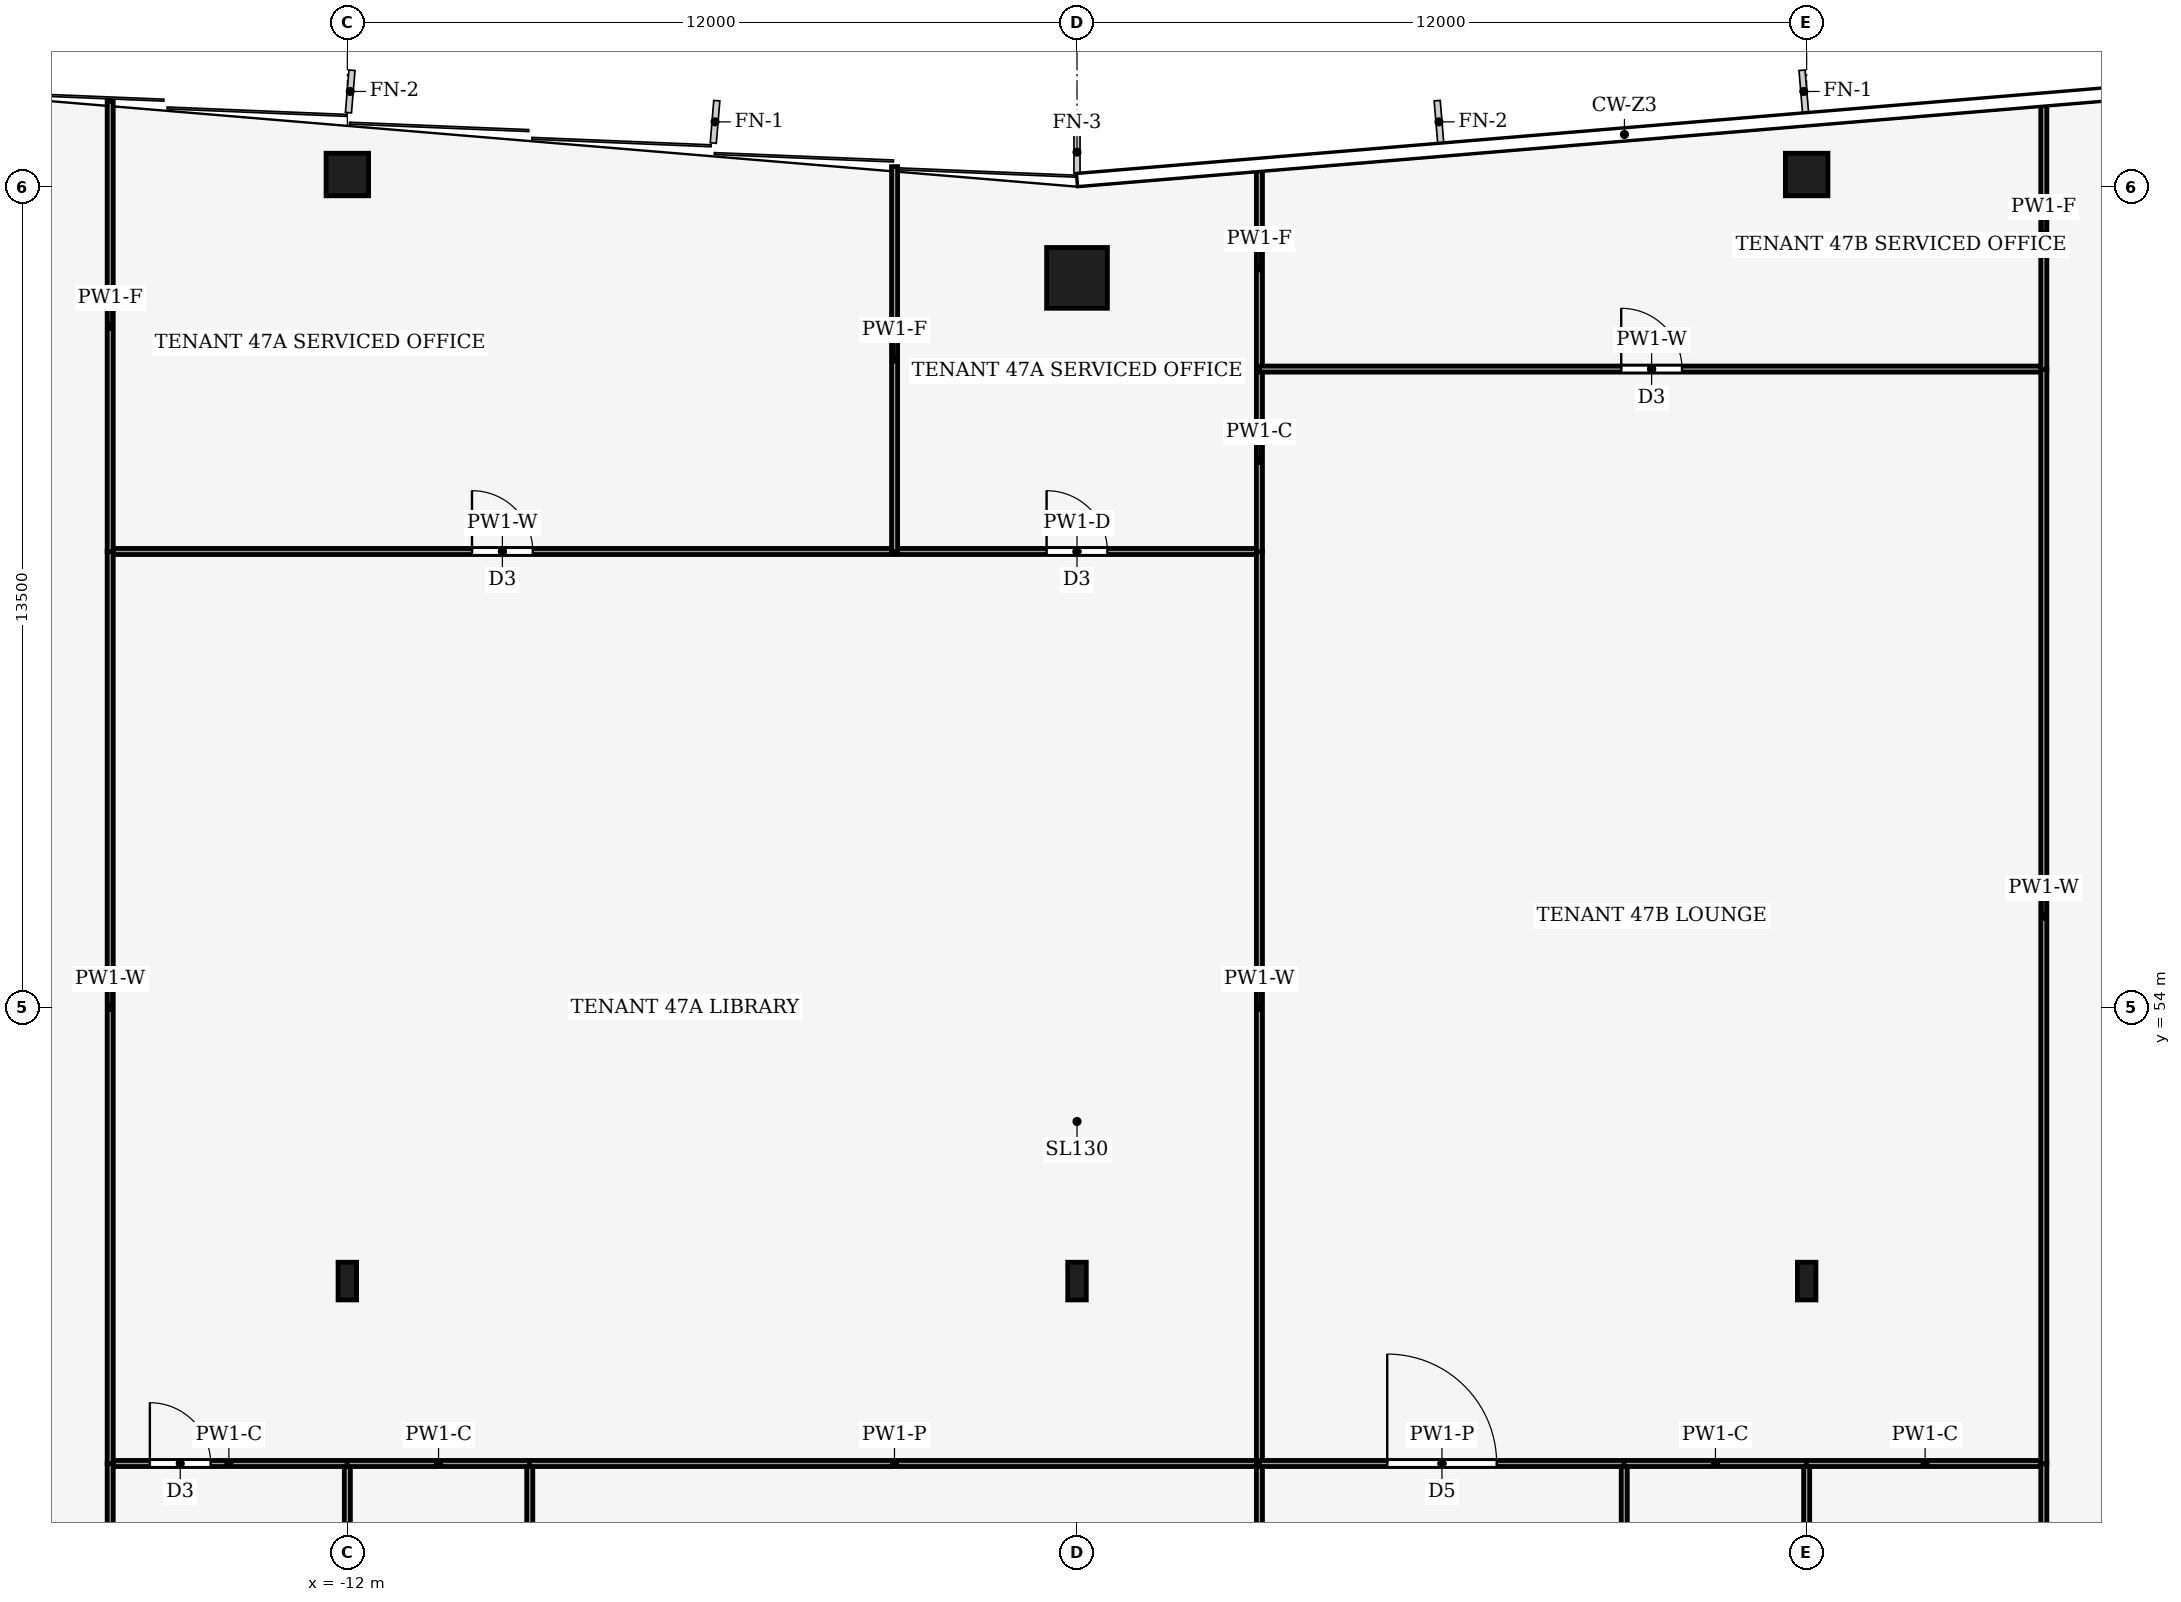
"""IFC4 building model, lengths in metres.
Left out: names, types, materials, properties, quantities, classifications, styles, units other than length and angle.
Written with IfcOpenShell. Run it as: python <this file> out.ifc"""

import sys

from ifc_helpers import new_model, si_unit, direction, frame, frame_2d, origin, origin_2d, place, context, subcontext, project, spatial, rectangle, hollow_rectangle, i_section, extrude, element, fill, save


model = new_model("IFC4")
c1 = context("Model", 3, precision=1e-05, world=origin(), true_north=direction((0.0, 1.0)))
c2 = subcontext(c1, "Body", "Model", "MODEL_VIEW")
j1 = project(units=[si_unit("LENGTHUNIT", "METRE"), si_unit("PLANEANGLEUNIT", "RADIAN")], contexts=[c1])
p1 = place(None, origin())
s1 = spatial("IfcSite", under=j1, at=p1, CompositionType="ELEMENT")
p2 = place(p1, origin())
s2 = spatial("IfcBuilding", under=s1, at=p2, CompositionType="ELEMENT")
p3 = place(p2, frame((0.0, 0.0, 206.0)))
s3 = spatial("IfcBuildingStorey", under=s2, at=p3, CompositionType="ELEMENT", Elevation=206.0)
p4 = place(p3, frame((0.0, 66.0, 0.0), z_axis=(0.0, 0.0, 1.0), x_axis=(1.0, 0.0, 0.0)))
e1 = element("IfcColumn", 1, at=p4, inside=s3, PredefinedType="COLUMN", context=c2, shape_type="SweptSolid", body=[
    extrude(hollow_rectangle(XDim=1.0, YDim=1.0, WallThickness=0.06, at=origin_2d()), origin(), (0.0, 0.0, 1.0), 4.0),
])
for number, where, z_axis, x_axis in (
    (2, (-12.0, 67.7, 0.0), (0.0, 0.0, 1.0), (1.0, 0.0, 0.0)),
    (3, (12.0, 67.7, 0.0), (0.0, 0.0, 1.0), (1.0, 0.0, 0.0)),
):
    element("IfcColumn", number, at=place(p3, frame(where, z_axis=z_axis, x_axis=x_axis)), inside=s3, PredefinedType="COLUMN", context=c2, shape_type="SweptSolid", body=[
        extrude(hollow_rectangle(XDim=0.7, YDim=0.7, WallThickness=0.03, at=origin_2d()), origin(), (0.0, 0.0, 1.0), 4.0),
    ])
for number, where, z_axis, x_axis in (
    (4, (-12.0, 49.5, 0.0), (0.0, 0.0, 1.0), (1.0, 0.0, 0.0)),
    (5, (0.0, 49.5, 0.0), (0.0, 0.0, 1.0), (1.0, 0.0, 0.0)),
    (6, (12.0, 49.5, 0.0), (0.0, 0.0, 1.0), (1.0, 0.0, 0.0)),
):
    element("IfcColumn", number, at=place(p3, frame(where, z_axis=z_axis, x_axis=x_axis)), inside=s3, PredefinedType="COLUMN", context=c2, shape_type="SweptSolid", body=[
        extrude(i_section(OverallWidth=0.305, OverallDepth=0.62, WebThickness=0.021, FlangeThickness=0.04, FilletRadius=0.027, at=origin_2d()), origin(), (0.0, 0.0, 1.0), 4.0),
    ])
p5 = place(p3, frame((-12.0, 46.5, 0.0), z_axis=(0.0, 0.0, 1.0), x_axis=(0.0, -1.0, 0.0)))
e7 = element("IfcWall", 7, at=p5, inside=s3, PredefinedType="PARTITIONING", context=c2, shape_type="SweptSolid", body=[
    extrude(rectangle(XDim=5.6, YDim=0.1, at=frame_2d((2.8, 0.0))), origin(), (0.0, 0.0, 1.0), 3.44),
])
p6 = place(p5, frame((2.3, 0.0, 0.0)))
e8 = element("IfcOpeningElement", 8, at=p6, cuts=e7, PredefinedType="OPENING", context=c2, shape_type="SweptSolid", body=[
    extrude(rectangle(XDim=1.0, YDim=2.1, at=frame_2d((0.5, 1.05))), frame((0.0, 0.06, 0.0), z_axis=(0.0, -1.0, 0.0), x_axis=(1.0, 0.0, 0.0)), (0.0, 0.0, 1.0), 0.12),
])
p7 = place(p3, frame((-15.9, 46.5, 0.0), z_axis=(0.0, 0.0, 1.0), x_axis=(1.0, 0.0, 0.0)))
e9 = element("IfcWall", 9, at=p7, inside=s3, PredefinedType="PARTITIONING", context=c2, shape_type="SweptSolid", body=[
    extrude(rectangle(XDim=3.904, YDim=0.1, at=frame_2d((1.952, 0.0))), origin(), (0.0, 0.0, 1.0), 3.87),
])
p8 = place(p7, frame((0.652, 0.0, 0.0)))
e10 = element("IfcOpeningElement", 10, at=p8, cuts=e9, PredefinedType="OPENING", context=c2, shape_type="SweptSolid", body=[
    extrude(rectangle(XDim=1.0, YDim=2.1, at=frame_2d((0.5, 1.05))), frame((0.0, 0.06, 0.0), z_axis=(0.0, -1.0, 0.0), x_axis=(1.0, 0.0, 0.0)), (0.0, 0.0, 1.0), 0.12),
])
p9 = place(p3, frame((-15.9, 46.504, 0.0), z_axis=(0.0, 0.0, 1.0), x_axis=(0.0, -1.0, 0.0)))
e11 = element("IfcWall", 11, at=p9, inside=s3, PredefinedType="PARTITIONING", context=c2, shape_type="SweptSolid", body=[
    extrude(rectangle(XDim=5.608, YDim=0.1, at=frame_2d((2.804, 0.0))), origin(), (0.0, 0.0, 1.0), 3.44),
])
p10 = place(p3, frame((-9.0, 40.9, 0.0), z_axis=(0.0, 0.0, 1.0), x_axis=(0.0, 1.0, 0.0)))
e12 = element("IfcWall", 12, at=p10, inside=s3, PredefinedType="PARTITIONING", context=c2, shape_type="SweptSolid", body=[
    extrude(rectangle(XDim=5.6, YDim=0.1, at=frame_2d((2.8, 0.0))), origin(), (0.0, 0.0, 1.0), 3.87),
])
p11 = place(p3, frame((-8.996, 46.5, 0.0), z_axis=(0.0, 0.0, 1.0), x_axis=(-1.0, 0.0, 0.0)))
e13 = element("IfcWall", 13, at=p11, inside=s3, PredefinedType="PARTITIONING", context=c2, shape_type="SweptSolid", body=[
    extrude(rectangle(XDim=3.008, YDim=0.1, at=frame_2d((1.504, 0.0))), origin(), (0.0, 0.0, 1.0), 3.87),
])
p12 = place(p3, frame((3.0, 46.5, 0.0), z_axis=(0.0, 0.0, 1.0), x_axis=(-1.0, 0.0, 0.0)))
e14 = element("IfcWall", 14, at=p12, inside=s3, PredefinedType="PARTITIONING", context=c2, shape_type="SweptSolid", body=[
    extrude(rectangle(XDim=12.004, YDim=0.1, at=frame_2d((6.002, 0.0))), origin(), (0.0, 0.0, 1.0), 3.44),
])
p13 = place(p3, frame((3.0, 40.9, 0.0), z_axis=(0.0, 0.0, 1.0), x_axis=(0.0, 1.0, 0.0)))
e15 = element("IfcWall", 15, at=p13, inside=s3, PredefinedType="PARTITIONING", context=c2, shape_type="SweptSolid", body=[
    extrude(rectangle(XDim=5.6, YDim=0.1, at=frame_2d((2.8, 0.0))), origin(), (0.0, 0.0, 1.0), 3.87),
])
p14 = place(p3, frame((-15.9, 61.5, 0.0), z_axis=(0.0, 0.0, 1.0), x_axis=(1.0, 0.0, 0.0)))
e16 = element("IfcWall", 16, at=p14, inside=s3, PredefinedType="PARTITIONING", context=c2, shape_type="SweptSolid", body=[
    extrude(rectangle(XDim=12.9, YDim=0.1, at=frame_2d((6.45, 0.0))), origin(), (0.0, 0.0, 1.0), 3.24),
])
p15 = place(p14, frame((5.95, 0.0, 0.0)))
e17 = element("IfcOpeningElement", 17, at=p15, cuts=e16, PredefinedType="OPENING", context=c2, shape_type="SweptSolid", body=[
    extrude(rectangle(XDim=1.0, YDim=2.1, at=frame_2d((0.5, 1.05))), frame((0.0, 0.06, 0.0), z_axis=(0.0, -1.0, 0.0), x_axis=(1.0, 0.0, 0.0)), (0.0, 0.0, 1.0), 0.12),
])
p16 = place(p3, frame((-3.0, 61.5, 0.0), z_axis=(0.0, 0.0, 1.0), x_axis=(1.0, 0.0, 0.0)))
e18 = element("IfcWall", 18, at=p16, inside=s3, PredefinedType="PARTITIONING", context=c2, shape_type="SweptSolid", body=[
    extrude(rectangle(XDim=6.0, YDim=0.1, at=frame_2d((3.0, 0.0))), origin(), (0.0, 0.0, 1.0), 3.29),
])
p17 = place(p16, frame((2.5, 0.0, 0.0)))
e19 = element("IfcOpeningElement", 19, at=p17, cuts=e18, PredefinedType="OPENING", context=c2, shape_type="SweptSolid", body=[
    extrude(rectangle(XDim=1.0, YDim=2.1, at=frame_2d((0.5, 1.05))), frame((0.0, 0.06, 0.0), z_axis=(0.0, -1.0, 0.0), x_axis=(1.0, 0.0, 0.0)), (0.0, 0.0, 1.0), 0.12),
])
p18 = place(p3, frame((3.0, 46.5, 0.0), z_axis=(0.0, 0.0, 1.0), x_axis=(0.0, 1.0, 0.0)))
e20 = element("IfcWall", 20, at=p18, inside=s3, PredefinedType="PARTITIONING", context=c2, shape_type="SweptSolid", body=[
    extrude(rectangle(XDim=15.004, YDim=0.1, at=frame_2d((7.502, 0.0))), origin(), (0.0, 0.0, 1.0), 3.24),
])
p19 = place(p3, frame((-15.9, 61.504, 0.0), z_axis=(0.0, 0.0, 1.0), x_axis=(0.0, -1.0, 0.0)))
e21 = element("IfcWall", 21, at=p19, inside=s3, PredefinedType="PARTITIONING", context=c2, shape_type="SweptSolid", body=[
    extrude(rectangle(XDim=15.008, YDim=0.1, at=frame_2d((7.504, 0.0))), origin(), (0.0, 0.0, 1.0), 3.24),
])
p20 = place(p3, frame((-3.0, 61.5, 0.0), z_axis=(0.0, 0.0, 1.0), x_axis=(0.0, 1.0, 0.0)))
e22 = element("IfcWall", 22, at=p20, inside=s3, PredefinedType="PARTITIONING", context=c2, shape_type="SweptSolid", body=[
    extrude(rectangle(XDim=6.33, YDim=0.1, at=frame_2d((3.165, 0.0))), origin(), (0.0, 0.0, 1.0), 3.04),
])
p21 = place(p3, frame((-15.9, 68.905, 0.0), z_axis=(0.0, 0.0, 1.0), x_axis=(0.0, -1.0, 0.0)))
e23 = element("IfcWall", 23, at=p21, inside=s3, PredefinedType="PARTITIONING", context=c2, shape_type="SweptSolid", body=[
    extrude(rectangle(XDim=7.409, YDim=0.1, at=frame_2d((3.705, 0.0))), origin(), (0.0, 0.0, 1.0), 3.04),
])
p22 = place(p3, frame((3.0, 61.496, 0.0), z_axis=(0.0, 0.0, 1.0), x_axis=(0.0, 1.0, 0.0)))
e24 = element("IfcWall", 24, at=p22, inside=s3, PredefinedType="PARTITIONING", context=c2, shape_type="SweptSolid", body=[
    extrude(rectangle(XDim=3.004, YDim=0.1, at=frame_2d((1.502, 0.0))), origin(), (0.0, 0.0, 1.0), 3.87),
])
p23 = place(p3, frame((3.0, 64.5, 0.0), z_axis=(0.0, 0.0, 1.0), x_axis=(0.0, 1.0, 0.0)))
e25 = element("IfcWall", 25, at=p23, inside=s3, PredefinedType="PARTITIONING", context=c2, shape_type="SweptSolid", body=[
    extrude(rectangle(XDim=3.33, YDim=0.1, at=frame_2d((1.665, 0.0))), origin(), (0.0, 0.0, 1.0), 3.04),
])
p24 = place(p3, frame((9.0, 46.5, 0.0), z_axis=(0.0, 0.0, 1.0), x_axis=(0.0, -1.0, 0.0)))
e26 = element("IfcWall", 26, at=p24, inside=s3, PredefinedType="PARTITIONING", context=c2, shape_type="SweptSolid", body=[
    extrude(rectangle(XDim=5.6, YDim=0.1, at=frame_2d((2.8, 0.0))), origin(), (0.0, 0.0, 1.0), 3.87),
])
p25 = place(p24, frame((2.3, 0.0, 0.0)))
e27 = element("IfcOpeningElement", 27, at=p25, cuts=e26, PredefinedType="OPENING", context=c2, shape_type="SweptSolid", body=[
    extrude(rectangle(XDim=1.0, YDim=2.1, at=frame_2d((0.5, 1.05))), frame((0.0, 0.06, 0.0), z_axis=(0.0, -1.0, 0.0), x_axis=(1.0, 0.0, 0.0)), (0.0, 0.0, 1.0), 0.12),
])
p26 = place(p3, frame((3.0, 46.5, 0.0), z_axis=(0.0, 0.0, 1.0), x_axis=(1.0, 0.0, 0.0)))
e28 = element("IfcWall", 28, at=p26, inside=s3, PredefinedType="PARTITIONING", context=c2, shape_type="SweptSolid", body=[
    extrude(rectangle(XDim=6.004, YDim=0.1, at=frame_2d((3.002, 0.0))), origin(), (0.0, 0.0, 1.0), 3.44),
])
p27 = place(p26, frame((2.102, 0.0, 0.0)))
e29 = element("IfcOpeningElement", 29, at=p27, cuts=e28, PredefinedType="OPENING", context=c2, shape_type="SweptSolid", body=[
    extrude(rectangle(XDim=1.8, YDim=2.1, at=frame_2d((0.9, 1.05))), frame((0.0, 0.06, 0.0), z_axis=(0.0, -1.0, 0.0), x_axis=(1.0, 0.0, 0.0)), (0.0, 0.0, 1.0), 0.12),
])
p28 = place(p3, frame((12.0, 40.9, 0.0), z_axis=(0.0, 0.0, 1.0), x_axis=(0.0, 1.0, 0.0)))
e30 = element("IfcWall", 30, at=p28, inside=s3, PredefinedType="PARTITIONING", context=c2, shape_type="SweptSolid", body=[
    extrude(rectangle(XDim=5.6, YDim=0.1, at=frame_2d((2.8, 0.0))), origin(), (0.0, 0.0, 1.0), 3.44),
])
p29 = place(p3, frame((12.004, 46.5, 0.0), z_axis=(0.0, 0.0, 1.0), x_axis=(-1.0, 0.0, 0.0)))
e31 = element("IfcWall", 31, at=p29, inside=s3, PredefinedType="PARTITIONING", context=c2, shape_type="SweptSolid", body=[
    extrude(rectangle(XDim=3.008, YDim=0.1, at=frame_2d((1.504, 0.0))), origin(), (0.0, 0.0, 1.0), 3.87),
])
p30 = place(p3, frame((15.9, 46.5, 0.0), z_axis=(0.0, 0.0, 1.0), x_axis=(-1.0, 0.0, 0.0)))
e32 = element("IfcWall", 32, at=p30, inside=s3, PredefinedType="PARTITIONING", context=c2, shape_type="SweptSolid", body=[
    extrude(rectangle(XDim=3.904, YDim=0.1, at=frame_2d((1.952, 0.0))), origin(), (0.0, 0.0, 1.0), 3.87),
])
p31 = place(p3, frame((15.9, 40.896, 0.0), z_axis=(0.0, 0.0, 1.0), x_axis=(0.0, 1.0, 0.0)))
e33 = element("IfcWall", 33, at=p31, inside=s3, PredefinedType="PARTITIONING", context=c2, shape_type="SweptSolid", body=[
    extrude(rectangle(XDim=5.608, YDim=0.1, at=frame_2d((2.804, 0.0))), origin(), (0.0, 0.0, 1.0), 3.44),
])
p32 = place(p3, frame((3.0, 64.5, 0.0), z_axis=(0.0, 0.0, 1.0), x_axis=(1.0, 0.0, 0.0)))
e34 = element("IfcWall", 34, at=p32, inside=s3, PredefinedType="PARTITIONING", context=c2, shape_type="SweptSolid", body=[
    extrude(rectangle(XDim=12.9, YDim=0.1, at=frame_2d((6.45, 0.0))), origin(), (0.0, 0.0, 1.0), 3.24),
])
p33 = place(p32, frame((5.95, 0.0, 0.0)))
e35 = element("IfcOpeningElement", 35, at=p33, cuts=e34, PredefinedType="OPENING", context=c2, shape_type="SweptSolid", body=[
    extrude(rectangle(XDim=1.0, YDim=2.1, at=frame_2d((0.5, 1.05))), frame((0.0, 0.06, 0.0), z_axis=(0.0, -1.0, 0.0), x_axis=(1.0, 0.0, 0.0)), (0.0, 0.0, 1.0), 0.12),
])
p34 = place(p3, frame((15.9, 46.496, 0.0), z_axis=(0.0, 0.0, 1.0), x_axis=(0.0, 1.0, 0.0)))
e36 = element("IfcWall", 36, at=p34, inside=s3, PredefinedType="PARTITIONING", context=c2, shape_type="SweptSolid", body=[
    extrude(rectangle(XDim=18.008, YDim=0.1, at=frame_2d((9.004, 0.0))), origin(), (0.0, 0.0, 1.0), 3.24),
])
p35 = place(p3, frame((15.9, 64.496, 0.0), z_axis=(0.0, 0.0, 1.0), x_axis=(0.0, 1.0, 0.0)))
e37 = element("IfcWall", 37, at=p35, inside=s3, PredefinedType="PARTITIONING", context=c2, shape_type="SweptSolid", body=[
    extrude(rectangle(XDim=4.409, YDim=0.1, at=frame_2d((2.205, 0.0))), origin(), (0.0, 0.0, 1.0), 3.04),
])
p36 = place(p8, origin())
e38 = element("IfcDoor", 38, at=p36, inside=s3, OperationType="SINGLE_SWING_LEFT", PredefinedType="DOOR", context=c2, shape_type="SweptSolid", body=[
    extrude(rectangle(XDim=1.0, YDim=2.1, at=frame_2d((0.5, 1.05))), frame((0.0, 0.025, 0.0), z_axis=(0.0, -1.0, 0.0), x_axis=(1.0, 0.0, 0.0)), (0.0, 0.0, 1.0), 0.05),
])
fill(e10, e38)
p37 = place(p15, origin())
e39 = element("IfcDoor", 39, at=p37, inside=s3, OperationType="SINGLE_SWING_RIGHT", PredefinedType="DOOR", context=c2, shape_type="SweptSolid", body=[
    extrude(rectangle(XDim=1.0, YDim=2.1, at=frame_2d((0.5, 1.05))), frame((0.0, 0.025, 0.0), z_axis=(0.0, -1.0, 0.0), x_axis=(1.0, 0.0, 0.0)), (0.0, 0.0, 1.0), 0.05),
])
fill(e17, e39)
p38 = place(p17, origin())
e40 = element("IfcDoor", 40, at=p38, inside=s3, OperationType="SINGLE_SWING_LEFT", PredefinedType="DOOR", context=c2, shape_type="SweptSolid", body=[
    extrude(rectangle(XDim=1.0, YDim=2.1, at=frame_2d((0.5, 1.05))), frame((0.0, 0.025, 0.0), z_axis=(0.0, -1.0, 0.0), x_axis=(1.0, 0.0, 0.0)), (0.0, 0.0, 1.0), 0.05),
])
fill(e19, e40)
p39 = place(p27, origin())
e41 = element("IfcDoor", 41, at=p39, inside=s3, OperationType="DOUBLE_DOOR_SINGLE_SWING", PredefinedType="DOOR", context=c2, shape_type="SweptSolid", body=[
    extrude(rectangle(XDim=1.8, YDim=2.1, at=frame_2d((0.9, 1.05))), frame((0.0, 0.025, 0.0), z_axis=(0.0, -1.0, 0.0), x_axis=(1.0, 0.0, 0.0)), (0.0, 0.0, 1.0), 0.05),
])
fill(e29, e41)
p40 = place(p33, origin())
e42 = element("IfcDoor", 42, at=p40, inside=s3, OperationType="SINGLE_SWING_RIGHT", PredefinedType="DOOR", context=c2, shape_type="SweptSolid", body=[
    extrude(rectangle(XDim=1.0, YDim=2.1, at=frame_2d((0.5, 1.05))), frame((0.0, 0.025, 0.0), z_axis=(0.0, -1.0, 0.0), x_axis=(1.0, 0.0, 0.0)), (0.0, 0.0, 1.0), 0.05),
])
fill(e35, e42)
save(model, sys.argv[1])
